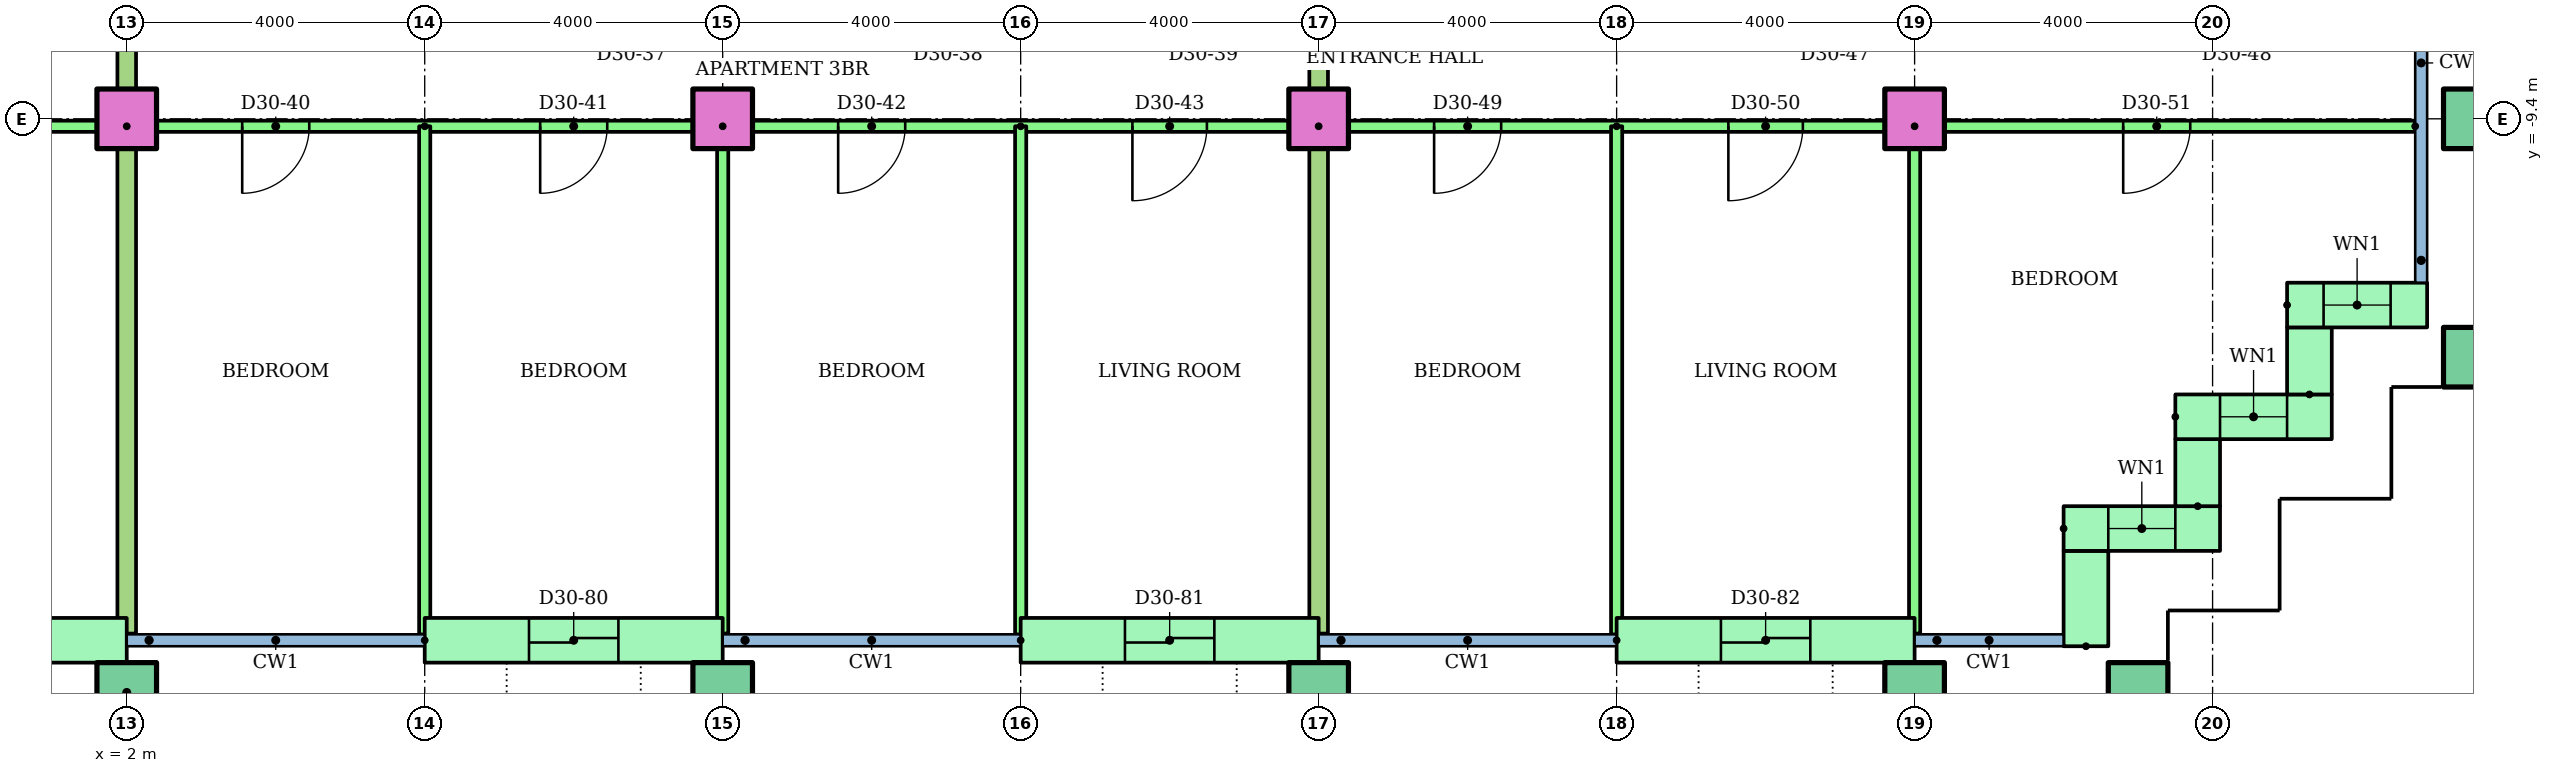
"""IFC4 building model, lengths in metres.
Left out: names, types, materials, properties, quantities, classifications, styles, units other than length and angle.
Written with IfcOpenShell. Run it as: python <this file> out.ifc"""

import sys

from ifc_helpers import new_model, si_unit, direction, frame, frame_2d, origin, origin_2d, place, context, subcontext, project, spatial, rectangle, hollow_rectangle, extrude, element, fill, save


model = new_model("IFC4")
c1 = context("Model", 3, precision=1e-05, world=origin(), true_north=direction((0.0, 1.0)))
c2 = subcontext(c1, "Body", "Model", "MODEL_VIEW")
j1 = project(units=[si_unit("LENGTHUNIT", "METRE"), si_unit("PLANEANGLEUNIT", "RADIAN")], contexts=[c1])
p1 = place(None, origin())
s1 = spatial("IfcSite", under=j1, at=p1, CompositionType="ELEMENT")
p2 = place(p1, origin())
s2 = spatial("IfcBuilding", under=s1, at=p2, CompositionType="ELEMENT")
p3 = place(p2, frame((0.0, 0.0, 119.8)))
s3 = spatial("IfcBuildingStorey", under=s2, at=p3, CompositionType="ELEMENT", Elevation=119.8)
for number, where in (
    (1, (2.0, -17.1, 0.0)),
    (2, (10.0, -17.1, 0.0)),
    (3, (18.0, -17.1, 0.0)),
    (4, (26.0, -17.1, 0.0)),
    (5, (29.0, -17.1, 0.0)),
    (6, (33.5, -12.6, 0.0)),
):
    element("IfcColumn", number, at=place(p3, frame(where)), inside=s3, PredefinedType="COLUMN", context=c2, shape_type="SweptSolid", body=[
        extrude(hollow_rectangle(XDim=0.8, YDim=0.8, WallThickness=0.04, at=origin_2d()), origin(), (0.0, 0.0, 1.0), 3.2),
    ])
for number, where in (
    (7, (2.0, -9.4, 0.0)),
    (8, (10.0, -9.4, 0.0)),
    (9, (18.0, -9.4, 0.0)),
    (10, (26.0, -9.4, 0.0)),
):
    element("IfcColumn", number, at=place(p3, frame(where)), inside=s3, PredefinedType="COLUMN", context=c2, shape_type="SweptSolid", body=[
        extrude(rectangle(XDim=0.8, YDim=0.8, at=origin_2d()), origin(), (0.0, 0.0, 1.0), 3.2),
    ])
p4 = place(p3, frame((33.5, -9.4, 0.0)))
e11 = element("IfcColumn", 11, at=p4, inside=s3, PredefinedType="COLUMN", context=c2, shape_type="SweptSolid", body=[
    extrude(hollow_rectangle(XDim=0.8, YDim=0.8, WallThickness=0.04, at=origin_2d()), origin(), (0.0, 0.0, 1.0), 3.2),
])
p5 = place(p3, frame((-2.0, -16.4, 0.0)))
e12 = element("IfcWall", 12, at=p5, inside=s3, PredefinedType="STANDARD", context=c2, shape_type="SweptSolid", body=[
    extrude(rectangle(XDim=4.0, YDim=0.6, at=frame_2d((2.0, 0.0))), origin(), (0.0, 0.0, 1.0), 2.92),
])
p6 = place(p5, frame((1.4, 0.0, 0.0)))
e13 = element("IfcOpeningElement", 13, at=p6, cuts=e12, PredefinedType="OPENING", context=c2, shape_type="SweptSolid", body=[
    extrude(rectangle(XDim=1.2, YDim=2.1, at=frame_2d((0.6, 1.05))), frame((0.0, 0.31, 0.0), z_axis=(0.0, -1.0, 0.0), x_axis=(1.0, 0.0, 0.0)), (0.0, 0.0, 1.0), 0.62),
])
p7 = place(p3, frame((6.0, -16.4, 0.0)))
e14 = element("IfcWall", 14, at=p7, inside=s3, PredefinedType="STANDARD", context=c2, shape_type="SweptSolid", body=[
    extrude(rectangle(XDim=4.0, YDim=0.6, at=frame_2d((2.0, 0.0))), origin(), (0.0, 0.0, 1.0), 2.92),
])
p8 = place(p7, frame((1.4, 0.0, 0.0)))
e15 = element("IfcOpeningElement", 15, at=p8, cuts=e14, PredefinedType="OPENING", context=c2, shape_type="SweptSolid", body=[
    extrude(rectangle(XDim=1.2, YDim=2.1, at=frame_2d((0.6, 1.05))), frame((0.0, 0.31, 0.0), z_axis=(0.0, -1.0, 0.0), x_axis=(1.0, 0.0, 0.0)), (0.0, 0.0, 1.0), 0.62),
])
p9 = place(p3, frame((14.0, -16.4, 0.0)))
e16 = element("IfcWall", 16, at=p9, inside=s3, PredefinedType="STANDARD", context=c2, shape_type="SweptSolid", body=[
    extrude(rectangle(XDim=4.0, YDim=0.6, at=frame_2d((2.0, 0.0))), origin(), (0.0, 0.0, 1.0), 2.92),
])
p10 = place(p9, frame((1.4, 0.0, 0.0)))
e17 = element("IfcOpeningElement", 17, at=p10, cuts=e16, PredefinedType="OPENING", context=c2, shape_type="SweptSolid", body=[
    extrude(rectangle(XDim=1.2, YDim=2.1, at=frame_2d((0.6, 1.05))), frame((0.0, 0.31, 0.0), z_axis=(0.0, -1.0, 0.0), x_axis=(1.0, 0.0, 0.0)), (0.0, 0.0, 1.0), 0.62),
])
p11 = place(p3, frame((22.0, -16.4, 0.0)))
e18 = element("IfcWall", 18, at=p11, inside=s3, PredefinedType="STANDARD", context=c2, shape_type="SweptSolid", body=[
    extrude(rectangle(XDim=4.0, YDim=0.6, at=frame_2d((2.0, 0.0))), origin(), (0.0, 0.0, 1.0), 2.92),
])
p12 = place(p11, frame((1.4, 0.0, 0.0)))
e19 = element("IfcOpeningElement", 19, at=p12, cuts=e18, PredefinedType="OPENING", context=c2, shape_type="SweptSolid", body=[
    extrude(rectangle(XDim=1.2, YDim=2.1, at=frame_2d((0.6, 1.05))), frame((0.0, 0.31, 0.0), z_axis=(0.0, -1.0, 0.0), x_axis=(1.0, 0.0, 0.0)), (0.0, 0.0, 1.0), 0.62),
])
p13 = place(p3, frame((28.3, -16.48, 0.0), z_axis=(0.0, 0.0, 1.0), x_axis=(0.0, 1.0, 0.0)))
e20 = element("IfcWall", 20, at=p13, inside=s3, PredefinedType="STANDARD", context=c2, shape_type="SweptSolid", body=[
    extrude(rectangle(XDim=1.28, YDim=0.6, at=frame_2d((0.64, 0.0))), origin(), (0.0, 0.0, 1.0), 2.92),
])
p14 = place(p3, frame((28.0, -14.9, 0.0)))
e21 = element("IfcWall", 21, at=p14, inside=s3, PredefinedType="STANDARD", context=c2, shape_type="SweptSolid", body=[
    extrude(rectangle(XDim=2.1, YDim=0.6, at=frame_2d((1.05, 0.0))), origin(), (0.0, 0.0, 1.0), 2.92),
])
p15 = place(p14, frame((0.6, 0.0, 0.9)))
e22 = element("IfcOpeningElement", 22, at=p15, cuts=e21, PredefinedType="OPENING", context=c2, shape_type="SweptSolid", body=[
    extrude(rectangle(XDim=0.9, YDim=1.5, at=frame_2d((0.45, 0.75))), frame((0.0, 0.31, 0.0), z_axis=(0.0, -1.0, 0.0), x_axis=(1.0, 0.0, 0.0)), (0.0, 0.0, 1.0), 0.62),
])
p16 = place(p3, frame((29.8, -14.6, 0.0), z_axis=(0.0, 0.0, 1.0), x_axis=(0.0, 1.0, 0.0)))
e23 = element("IfcWall", 23, at=p16, inside=s3, PredefinedType="STANDARD", context=c2, shape_type="SweptSolid", body=[
    extrude(rectangle(XDim=0.9, YDim=0.6, at=frame_2d((0.45, 0.0))), origin(), (0.0, 0.0, 1.0), 2.92),
])
p17 = place(p3, frame((29.5, -13.4, 0.0)))
e24 = element("IfcWall", 24, at=p17, inside=s3, PredefinedType="STANDARD", context=c2, shape_type="SweptSolid", body=[
    extrude(rectangle(XDim=2.1, YDim=0.6, at=frame_2d((1.05, 0.0))), origin(), (0.0, 0.0, 1.0), 2.92),
])
p18 = place(p17, frame((0.6, 0.0, 0.9)))
e25 = element("IfcOpeningElement", 25, at=p18, cuts=e24, PredefinedType="OPENING", context=c2, shape_type="SweptSolid", body=[
    extrude(rectangle(XDim=0.9, YDim=1.5, at=frame_2d((0.45, 0.75))), frame((0.0, 0.31, 0.0), z_axis=(0.0, -1.0, 0.0), x_axis=(1.0, 0.0, 0.0)), (0.0, 0.0, 1.0), 0.62),
])
p19 = place(p3, frame((31.3, -13.1, 0.0), z_axis=(0.0, 0.0, 1.0), x_axis=(0.0, 1.0, 0.0)))
e26 = element("IfcWall", 26, at=p19, inside=s3, PredefinedType="STANDARD", context=c2, shape_type="SweptSolid", body=[
    extrude(rectangle(XDim=0.9, YDim=0.6, at=frame_2d((0.45, 0.0))), origin(), (0.0, 0.0, 1.0), 2.92),
])
p20 = place(p3, frame((31.0, -11.9, 0.0)))
e27 = element("IfcWall", 27, at=p20, inside=s3, PredefinedType="STANDARD", context=c2, shape_type="SweptSolid", body=[
    extrude(rectangle(XDim=1.88, YDim=0.6, at=frame_2d((0.94, 0.0))), origin(), (0.0, 0.0, 1.0), 2.92),
])
p21 = place(p20, frame((0.49, 0.0, 0.9)))
e28 = element("IfcOpeningElement", 28, at=p21, cuts=e27, PredefinedType="OPENING", context=c2, shape_type="SweptSolid", body=[
    extrude(rectangle(XDim=0.9, YDim=1.5, at=frame_2d((0.45, 0.75))), frame((0.0, 0.31, 0.0), z_axis=(0.0, -1.0, 0.0), x_axis=(1.0, 0.0, 0.0)), (0.0, 0.0, 1.0), 0.62),
])
p22 = place(p3, frame((2.0, -9.5, 0.0), z_axis=(0.0, 0.0, 1.0), x_axis=(-1.0, 0.0, 0.0)))
e29 = element("IfcWall", 29, at=p22, inside=s3, PredefinedType="PARTITIONING", context=c2, shape_type="SweptSolid", body=[
    extrude(rectangle(XDim=16.0, YDim=0.15, at=frame_2d((8.0, 0.0))), origin(), (0.0, 0.0, 1.0), 2.4),
])
p23 = place(p22, frame((13.55, 0.0, 0.0)))
e30 = element("IfcOpeningElement", 30, at=p23, cuts=e29, PredefinedType="OPENING", context=c2, shape_type="SweptSolid", body=[
    extrude(rectangle(XDim=0.9, YDim=2.1, at=frame_2d((0.45, 1.05))), frame((0.0, 0.085, 0.0), z_axis=(0.0, -1.0, 0.0), x_axis=(1.0, 0.0, 0.0)), (0.0, 0.0, 1.0), 0.17),
])
p24 = place(p22, frame((9.5, 0.0, 0.0)))
e31 = element("IfcOpeningElement", 31, at=p24, cuts=e29, PredefinedType="OPENING", context=c2, shape_type="SweptSolid", body=[
    extrude(rectangle(XDim=1.0, YDim=2.1, at=frame_2d((0.5, 1.05))), frame((0.0, 0.085, 0.0), z_axis=(0.0, -1.0, 0.0), x_axis=(1.0, 0.0, 0.0)), (0.0, 0.0, 1.0), 0.17),
])
p25 = place(p22, frame((5.55, 0.0, 0.0)))
e32 = element("IfcOpeningElement", 32, at=p25, cuts=e29, PredefinedType="OPENING", context=c2, shape_type="SweptSolid", body=[
    extrude(rectangle(XDim=0.9, YDim=2.1, at=frame_2d((0.45, 1.05))), frame((0.0, 0.085, 0.0), z_axis=(0.0, -1.0, 0.0), x_axis=(1.0, 0.0, 0.0)), (0.0, 0.0, 1.0), 0.17),
])
p26 = place(p22, frame((1.55, 0.0, 0.0)))
e33 = element("IfcOpeningElement", 33, at=p26, cuts=e29, PredefinedType="OPENING", context=c2, shape_type="SweptSolid", body=[
    extrude(rectangle(XDim=0.9, YDim=2.1, at=frame_2d((0.45, 1.05))), frame((0.0, 0.085, 0.0), z_axis=(0.0, -1.0, 0.0), x_axis=(1.0, 0.0, 0.0)), (0.0, 0.0, 1.0), 0.17),
])
p27 = place(p3, frame((18.0, -9.5, 0.0), z_axis=(0.0, 0.0, 1.0), x_axis=(-1.0, 0.0, 0.0)))
e34 = element("IfcWall", 34, at=p27, inside=s3, PredefinedType="PARTITIONING", context=c2, shape_type="SweptSolid", body=[
    extrude(rectangle(XDim=16.0, YDim=0.15, at=frame_2d((8.0, 0.0))), origin(), (0.0, 0.0, 1.0), 2.4),
])
p28 = place(p27, frame((13.55, 0.0, 0.0)))
e35 = element("IfcOpeningElement", 35, at=p28, cuts=e34, PredefinedType="OPENING", context=c2, shape_type="SweptSolid", body=[
    extrude(rectangle(XDim=0.9, YDim=2.1, at=frame_2d((0.45, 1.05))), frame((0.0, 0.085, 0.0), z_axis=(0.0, -1.0, 0.0), x_axis=(1.0, 0.0, 0.0)), (0.0, 0.0, 1.0), 0.17),
])
p29 = place(p27, frame((9.55, 0.0, 0.0)))
e36 = element("IfcOpeningElement", 36, at=p29, cuts=e34, PredefinedType="OPENING", context=c2, shape_type="SweptSolid", body=[
    extrude(rectangle(XDim=0.9, YDim=2.1, at=frame_2d((0.45, 1.05))), frame((0.0, 0.085, 0.0), z_axis=(0.0, -1.0, 0.0), x_axis=(1.0, 0.0, 0.0)), (0.0, 0.0, 1.0), 0.17),
])
p30 = place(p27, frame((5.55, 0.0, 0.0)))
e37 = element("IfcOpeningElement", 37, at=p30, cuts=e34, PredefinedType="OPENING", context=c2, shape_type="SweptSolid", body=[
    extrude(rectangle(XDim=0.9, YDim=2.1, at=frame_2d((0.45, 1.05))), frame((0.0, 0.085, 0.0), z_axis=(0.0, -1.0, 0.0), x_axis=(1.0, 0.0, 0.0)), (0.0, 0.0, 1.0), 0.17),
])
p31 = place(p27, frame((1.5, 0.0, 0.0)))
e38 = element("IfcOpeningElement", 38, at=p31, cuts=e34, PredefinedType="OPENING", context=c2, shape_type="SweptSolid", body=[
    extrude(rectangle(XDim=1.0, YDim=2.1, at=frame_2d((0.5, 1.05))), frame((0.0, 0.085, 0.0), z_axis=(0.0, -1.0, 0.0), x_axis=(1.0, 0.0, 0.0)), (0.0, 0.0, 1.0), 0.17),
])
p32 = place(p3, frame((6.0, -9.5, 0.0), z_axis=(0.0, 0.0, 1.0), x_axis=(0.0, -1.0, 0.0)))
e39 = element("IfcWall", 39, at=p32, inside=s3, PredefinedType="PARTITIONING", context=c2, shape_type="SweptSolid", body=[
    extrude(rectangle(XDim=6.821, YDim=0.15, at=frame_2d((3.411, 0.0))), origin(), (0.0, 0.0, 1.0), 2.4),
])
p33 = place(p3, frame((10.0, -9.5, 0.0), z_axis=(0.0, 0.0, 1.0), x_axis=(0.0, -1.0, 0.0)))
e40 = element("IfcWall", 40, at=p33, inside=s3, PredefinedType="PARTITIONING", context=c2, shape_type="SweptSolid", body=[
    extrude(rectangle(XDim=6.81, YDim=0.15, at=frame_2d((3.405, 0.0))), origin(), (0.0, 0.0, 1.0), 2.4),
])
p34 = place(p3, frame((14.0, -9.5, 0.0), z_axis=(0.0, 0.0, 1.0), x_axis=(0.0, -1.0, 0.0)))
e41 = element("IfcWall", 41, at=p34, inside=s3, PredefinedType="PARTITIONING", context=c2, shape_type="SweptSolid", body=[
    extrude(rectangle(XDim=6.821, YDim=0.15, at=frame_2d((3.411, 0.0))), origin(), (0.0, 0.0, 1.0), 2.4),
])
p35 = place(p3, frame((2.0, -1.4, 0.0), z_axis=(0.0, 0.0, 1.0), x_axis=(0.0, -1.0, 0.0)))
e42 = element("IfcWall", 42, at=p35, inside=s3, PredefinedType="PARTITIONING", context=c2, shape_type="SweptSolid", body=[
    extrude(rectangle(XDim=14.91, YDim=0.25, at=frame_2d((7.455, 0.0))), origin(), (0.0, 0.0, 1.0), 2.4),
])
p36 = place(p3, frame((32.72, -9.5, 0.0), z_axis=(0.0, 0.0, 1.0), x_axis=(-1.0, 0.0, 0.0)))
e43 = element("IfcWall", 43, at=p36, inside=s3, PredefinedType="PARTITIONING", context=c2, shape_type="SweptSolid", body=[
    extrude(rectangle(XDim=14.72, YDim=0.15, at=frame_2d((7.36, 0.0))), origin(), (0.0, 0.0, 1.0), 2.4),
])
p37 = place(p36, frame((12.27, 0.0, 0.0)))
e44 = element("IfcOpeningElement", 44, at=p37, cuts=e43, PredefinedType="OPENING", context=c2, shape_type="SweptSolid", body=[
    extrude(rectangle(XDim=0.9, YDim=2.1, at=frame_2d((0.45, 1.05))), frame((0.0, 0.085, 0.0), z_axis=(0.0, -1.0, 0.0), x_axis=(1.0, 0.0, 0.0)), (0.0, 0.0, 1.0), 0.17),
])
p38 = place(p36, frame((8.22, 0.0, 0.0)))
e45 = element("IfcOpeningElement", 45, at=p38, cuts=e43, PredefinedType="OPENING", context=c2, shape_type="SweptSolid", body=[
    extrude(rectangle(XDim=1.0, YDim=2.1, at=frame_2d((0.5, 1.05))), frame((0.0, 0.085, 0.0), z_axis=(0.0, -1.0, 0.0), x_axis=(1.0, 0.0, 0.0)), (0.0, 0.0, 1.0), 0.17),
])
p39 = place(p36, frame((3.02, 0.0, 0.0)))
e46 = element("IfcOpeningElement", 46, at=p39, cuts=e43, PredefinedType="OPENING", context=c2, shape_type="SweptSolid", body=[
    extrude(rectangle(XDim=0.9, YDim=2.1, at=frame_2d((0.45, 1.05))), frame((0.0, 0.085, 0.0), z_axis=(0.0, -1.0, 0.0), x_axis=(1.0, 0.0, 0.0)), (0.0, 0.0, 1.0), 0.17),
])
p40 = place(p3, frame((22.0, -9.5, 0.0), z_axis=(0.0, 0.0, 1.0), x_axis=(0.0, -1.0, 0.0)))
e47 = element("IfcWall", 47, at=p40, inside=s3, PredefinedType="PARTITIONING", context=c2, shape_type="SweptSolid", body=[
    extrude(rectangle(XDim=6.821, YDim=0.15, at=frame_2d((3.411, 0.0))), origin(), (0.0, 0.0, 1.0), 2.4),
])
p41 = place(p3, frame((26.0, -9.5, 0.0), z_axis=(0.0, 0.0, 1.0), x_axis=(0.0, -1.0, 0.0)))
e48 = element("IfcWall", 48, at=p41, inside=s3, PredefinedType="PARTITIONING", context=c2, shape_type="SweptSolid", body=[
    extrude(rectangle(XDim=6.81, YDim=0.15, at=frame_2d((3.405, 0.0))), origin(), (0.0, 0.0, 1.0), 2.4),
])
p42 = place(p3, frame((18.0, -1.4, 0.0), z_axis=(0.0, 0.0, 1.0), x_axis=(0.0, -1.0, 0.0)))
e49 = element("IfcWall", 49, at=p42, inside=s3, PredefinedType="PARTITIONING", context=c2, shape_type="SweptSolid", body=[
    extrude(rectangle(XDim=14.91, YDim=0.25, at=frame_2d((7.455, 0.0))), origin(), (0.0, 0.0, 1.0), 2.4),
])
p43 = place(p15, origin())
e50 = element("IfcWindow", 50, at=p43, inside=s3, PartitioningType="SINGLE_PANEL", PredefinedType="WINDOW", context=c2, shape_type="SweptSolid", body=[
    extrude(rectangle(XDim=0.9, YDim=1.5, at=frame_2d((0.45, 0.75))), frame((0.0, 0.03, 0.0), z_axis=(0.0, -1.0, 0.0), x_axis=(1.0, 0.0, 0.0)), (0.0, 0.0, 1.0), 0.06),
])
fill(e22, e50)
p44 = place(p18, origin())
e51 = element("IfcWindow", 51, at=p44, inside=s3, PartitioningType="SINGLE_PANEL", PredefinedType="WINDOW", context=c2, shape_type="SweptSolid", body=[
    extrude(rectangle(XDim=0.9, YDim=1.5, at=frame_2d((0.45, 0.75))), frame((0.0, 0.03, 0.0), z_axis=(0.0, -1.0, 0.0), x_axis=(1.0, 0.0, 0.0)), (0.0, 0.0, 1.0), 0.06),
])
fill(e25, e51)
p45 = place(p21, origin())
e52 = element("IfcWindow", 52, at=p45, inside=s3, PartitioningType="SINGLE_PANEL", PredefinedType="WINDOW", context=c2, shape_type="SweptSolid", body=[
    extrude(rectangle(XDim=0.9, YDim=1.5, at=frame_2d((0.45, 0.75))), frame((0.0, 0.03, 0.0), z_axis=(0.0, -1.0, 0.0), x_axis=(1.0, 0.0, 0.0)), (0.0, 0.0, 1.0), 0.06),
])
fill(e28, e52)
p46 = place(p28, origin())
e53 = element("IfcDoor", 53, at=p46, inside=s3, OperationType="SINGLE_SWING_RIGHT", PredefinedType="DOOR", context=c2, shape_type="SweptSolid", body=[
    extrude(rectangle(XDim=0.9, YDim=2.1, at=frame_2d((0.45, 1.05))), frame((0.0, 0.025, 0.0), z_axis=(0.0, -1.0, 0.0), x_axis=(1.0, 0.0, 0.0)), (0.0, 0.0, 1.0), 0.05),
])
fill(e35, e53)
p47 = place(p29, origin())
e54 = element("IfcDoor", 54, at=p47, inside=s3, OperationType="SINGLE_SWING_RIGHT", PredefinedType="DOOR", context=c2, shape_type="SweptSolid", body=[
    extrude(rectangle(XDim=0.9, YDim=2.1, at=frame_2d((0.45, 1.05))), frame((0.0, 0.025, 0.0), z_axis=(0.0, -1.0, 0.0), x_axis=(1.0, 0.0, 0.0)), (0.0, 0.0, 1.0), 0.05),
])
fill(e36, e54)
p48 = place(p30, origin())
e55 = element("IfcDoor", 55, at=p48, inside=s3, OperationType="SINGLE_SWING_RIGHT", PredefinedType="DOOR", context=c2, shape_type="SweptSolid", body=[
    extrude(rectangle(XDim=0.9, YDim=2.1, at=frame_2d((0.45, 1.05))), frame((0.0, 0.025, 0.0), z_axis=(0.0, -1.0, 0.0), x_axis=(1.0, 0.0, 0.0)), (0.0, 0.0, 1.0), 0.05),
])
fill(e37, e55)
p49 = place(p31, origin())
e56 = element("IfcDoor", 56, at=p49, inside=s3, OperationType="SINGLE_SWING_RIGHT", PredefinedType="DOOR", context=c2, shape_type="SweptSolid", body=[
    extrude(rectangle(XDim=1.0, YDim=2.1, at=frame_2d((0.5, 1.05))), frame((0.0, 0.025, 0.0), z_axis=(0.0, -1.0, 0.0), x_axis=(1.0, 0.0, 0.0)), (0.0, 0.0, 1.0), 0.05),
])
fill(e38, e56)
p50 = place(p37, origin())
e57 = element("IfcDoor", 57, at=p50, inside=s3, OperationType="SINGLE_SWING_RIGHT", PredefinedType="DOOR", context=c2, shape_type="SweptSolid", body=[
    extrude(rectangle(XDim=0.9, YDim=2.1, at=frame_2d((0.45, 1.05))), frame((0.0, 0.025, 0.0), z_axis=(0.0, -1.0, 0.0), x_axis=(1.0, 0.0, 0.0)), (0.0, 0.0, 1.0), 0.05),
])
fill(e44, e57)
p51 = place(p38, origin())
e58 = element("IfcDoor", 58, at=p51, inside=s3, OperationType="SINGLE_SWING_RIGHT", PredefinedType="DOOR", context=c2, shape_type="SweptSolid", body=[
    extrude(rectangle(XDim=1.0, YDim=2.1, at=frame_2d((0.5, 1.05))), frame((0.0, 0.025, 0.0), z_axis=(0.0, -1.0, 0.0), x_axis=(1.0, 0.0, 0.0)), (0.0, 0.0, 1.0), 0.05),
])
fill(e45, e58)
p52 = place(p39, origin())
e59 = element("IfcDoor", 59, at=p52, inside=s3, OperationType="SINGLE_SWING_RIGHT", PredefinedType="DOOR", context=c2, shape_type="SweptSolid", body=[
    extrude(rectangle(XDim=0.9, YDim=2.1, at=frame_2d((0.45, 1.05))), frame((0.0, 0.025, 0.0), z_axis=(0.0, -1.0, 0.0), x_axis=(1.0, 0.0, 0.0)), (0.0, 0.0, 1.0), 0.05),
])
fill(e46, e59)
p53 = place(p8, origin())
e60 = element("IfcDoor", 60, at=p53, inside=s3, OperationType="SLIDING_TO_LEFT", PredefinedType="DOOR", context=c2, shape_type="SweptSolid", body=[
    extrude(rectangle(XDim=1.2, YDim=2.1, at=frame_2d((0.6, 1.05))), frame((0.0, 0.025, 0.0), z_axis=(0.0, -1.0, 0.0), x_axis=(1.0, 0.0, 0.0)), (0.0, 0.0, 1.0), 0.05),
])
fill(e15, e60)
p54 = place(p10, origin())
e61 = element("IfcDoor", 61, at=p54, inside=s3, OperationType="SLIDING_TO_LEFT", PredefinedType="DOOR", context=c2, shape_type="SweptSolid", body=[
    extrude(rectangle(XDim=1.2, YDim=2.1, at=frame_2d((0.6, 1.05))), frame((0.0, 0.025, 0.0), z_axis=(0.0, -1.0, 0.0), x_axis=(1.0, 0.0, 0.0)), (0.0, 0.0, 1.0), 0.05),
])
fill(e17, e61)
p55 = place(p12, origin())
e62 = element("IfcDoor", 62, at=p55, inside=s3, OperationType="SLIDING_TO_LEFT", PredefinedType="DOOR", context=c2, shape_type="SweptSolid", body=[
    extrude(rectangle(XDim=1.2, YDim=2.1, at=frame_2d((0.6, 1.05))), frame((0.0, 0.025, 0.0), z_axis=(0.0, -1.0, 0.0), x_axis=(1.0, 0.0, 0.0)), (0.0, 0.0, 1.0), 0.05),
])
fill(e19, e62)
save(model, sys.argv[1])
